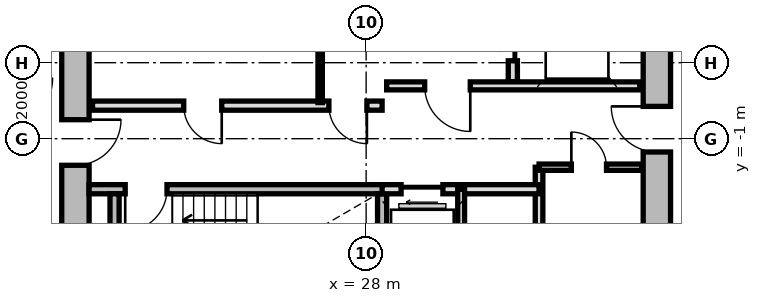
"""IFC4 building model, lengths in metres.
Left out: names, types, materials, properties, quantities, classifications, styles, units other than length and angle.
Written with IfcOpenShell. Run it as: python <this file> out.ifc"""

import sys

from ifc_helpers import new_model, si_unit, direction, frame, frame_2d, origin, place, context, subcontext, project, spatial, rectangle, extrude, source, transform, mapped, element, fill, save


model = new_model("IFC4")
c1 = context("Model", 3, precision=1e-05, world=origin(), true_north=direction((0.0, 1.0)))
c2 = subcontext(c1, "Body", "Model", "MODEL_VIEW")
j1 = project(units=[si_unit("LENGTHUNIT", "METRE"), si_unit("PLANEANGLEUNIT", "RADIAN")], contexts=[c1])
p1 = place(None, origin())
s1 = spatial("IfcSite", under=j1, at=p1, CompositionType="ELEMENT")
p2 = place(p1, origin())
s2 = spatial("IfcBuilding", under=s1, at=p2, CompositionType="ELEMENT")
p3 = place(p2, frame((0.0, 0.0, 84.05)))
s3 = spatial("IfcBuildingStorey", under=s2, at=p3, CompositionType="ELEMENT", Elevation=84.05)
m1 = source(origin(), c2, "Body", "SweptSolid", [
    extrude(rectangle(XDim=11.0, YDim=0.72, at=frame_2d((5.5, 0.0))), origin(), (0.0, 0.0, 1.0), 2.79),
])
p4 = place(p3, frame((20.35, -5.5, 0.0), z_axis=(0.0, 0.0, 1.0), x_axis=(0.0, 1.0, 0.0)))
e1 = element("IfcWall", 1, at=p4, inside=s3, PredefinedType="SHEAR", context=c2, shape_type="MappedRepresentation", body=[
    mapped(m1, transform((0.0, 0.0, 0.0), x_axis=(1.0, 0.0, 0.0), y_axis=(0.0, 1.0, 0.0), z_axis=(0.0, 0.0, 1.0), scale=1.0)),
])
p5 = place(p4, frame((3.8, 0.0, 0.0)))
e2 = element("IfcOpeningElement", 2, at=p5, cuts=e1, PredefinedType="OPENING", context=c2, shape_type="SweptSolid", body=[
    extrude(rectangle(XDim=1.2, YDim=2.15, at=frame_2d((0.6, 1.075))), frame((0.0, 0.37, 0.0), z_axis=(0.0, -1.0, 0.0), x_axis=(1.0, 0.0, 0.0)), (0.0, 0.0, 1.0), 0.74),
])
p6 = place(p3, frame((35.65, 5.5, 0.0), z_axis=(0.0, 0.0, 1.0), x_axis=(0.0, -1.0, 0.0)))
e3 = element("IfcWall", 3, at=p6, inside=s3, PredefinedType="SHEAR", context=c2, shape_type="MappedRepresentation", body=[
    mapped(m1, transform((0.0, 0.0, 0.0), x_axis=(1.0, 0.0, 0.0), y_axis=(0.0, 1.0, 0.0), z_axis=(0.0, 0.0, 1.0), scale=1.0)),
])
p7 = place(p6, frame((5.65, 0.0, 0.0)))
e4 = element("IfcOpeningElement", 4, at=p7, cuts=e3, PredefinedType="OPENING", context=c2, shape_type="SweptSolid", body=[
    extrude(rectangle(XDim=1.2, YDim=2.15, at=frame_2d((0.6, 1.075))), frame((0.0, 0.37, 0.0), z_axis=(0.0, -1.0, 0.0), x_axis=(1.0, 0.0, 0.0)), (0.0, 0.0, 1.0), 0.74),
])
m2 = source(origin(), c2, "Body", "SweptSolid", [
    extrude(rectangle(XDim=7.83, YDim=0.24, at=frame_2d((3.915, 0.0))), origin(), (0.0, 0.0, 1.0), 2.79),
])
p8 = place(p3, frame((20.71, -2.33, 0.0), z_axis=(0.0, 0.0, 1.0), x_axis=(1.0, 0.0, 0.0)))
e5 = element("IfcWall", 5, at=p8, inside=s3, PredefinedType="PARTITIONING", context=c2, shape_type="MappedRepresentation", body=[
    mapped(m2, transform((0.0, 0.0, 0.0), x_axis=(1.0, 0.0, 0.0), y_axis=(0.0, 1.0, 0.0), z_axis=(0.0, 0.0, 1.0), scale=1.0)),
])
p9 = place(p8, frame((0.95, 0.0, 0.0)))
e6 = element("IfcOpeningElement", 6, at=p9, cuts=e5, PredefinedType="OPENING", context=c2, shape_type="SweptSolid", body=[
    extrude(rectangle(XDim=1.1, YDim=2.15, at=frame_2d((0.55, 1.075))), frame((0.0, 0.13, 0.0), z_axis=(0.0, -1.0, 0.0), x_axis=(1.0, 0.0, 0.0)), (0.0, 0.0, 1.0), 0.26),
])
m3 = source(origin(), c2, "Body", "SweptSolid", [
    extrude(rectangle(XDim=3.14, YDim=0.24, at=frame_2d((1.57, 0.0))), origin(), (0.0, 0.0, 1.0), 2.79),
])
for number, where, z_axis, x_axis in (
    (7, (21.38, -5.59, 0.0), (0.0, 0.0, 1.0), (0.0, 1.0, 0.0)),
    (8, (28.42, -5.59, 0.0), (0.0, 0.0, 1.0), (0.0, 1.0, 0.0)),
):
    element("IfcWall", number, at=place(p3, frame(where, z_axis=z_axis, x_axis=x_axis)), inside=s3, PredefinedType="PARTITIONING", context=c2, shape_type="MappedRepresentation", body=[
        mapped(m3, transform((0.0, 0.0, 0.0), x_axis=(1.0, 0.0, 0.0), y_axis=(0.0, 1.0, 0.0), z_axis=(0.0, 0.0, 1.0), scale=1.0)),
    ])
m4 = source(origin(), c2, "Body", "SweptSolid", [
    extrude(rectangle(XDim=5.0, YDim=0.24, at=frame_2d((2.5, 0.0))), origin(), (0.0, 0.0, 1.0), 2.775),
])
p10 = place(p3, frame((31.86, 0.5, 0.0), z_axis=(0.0, 0.0, 1.0), x_axis=(0.0, 1.0, 0.0)))
e9 = element("IfcWall", 9, at=p10, inside=s3, PredefinedType="PARTITIONING", context=c2, shape_type="MappedRepresentation", body=[
    mapped(m4, transform((0.0, 0.0, 0.0), x_axis=(1.0, 0.0, 0.0), y_axis=(0.0, 1.0, 0.0), z_axis=(0.0, 0.0, 1.0), scale=1.0)),
])
p11 = place(p10, frame((3.05, 0.0, 0.0)))
e10 = element("IfcOpeningElement", 10, at=p11, cuts=e9, PredefinedType="OPENING", context=c2, shape_type="SweptSolid", body=[
    extrude(rectangle(XDim=1.3, YDim=2.2, at=frame_2d((0.65, 1.1))), frame((0.0, 0.13, 0.0), z_axis=(0.0, -1.0, 0.0), x_axis=(1.0, 0.0, 0.0)), (0.0, 0.0, 1.0), 0.26),
])
p12 = place(p10, frame((0.55, 0.0, 0.0)))
e11 = element("IfcOpeningElement", 11, at=p12, cuts=e9, PredefinedType="OPENING", context=c2, shape_type="SweptSolid", body=[
    extrude(rectangle(XDim=1.3, YDim=2.2, at=frame_2d((0.65, 1.1))), frame((0.0, 0.13, 0.0), z_axis=(0.0, -1.0, 0.0), x_axis=(1.0, 0.0, 0.0)), (0.0, 0.0, 1.0), 0.26),
])
m5 = source(origin(), c2, "Body", "SweptSolid", [
    extrude(rectangle(XDim=6.66, YDim=0.21, at=frame_2d((3.33, 0.0))), origin(), (0.0, 0.0, 1.0), 2.775),
])
p13 = place(p3, frame((28.54, 0.39, 0.0), z_axis=(0.0, 0.0, 1.0), x_axis=(1.0, 0.0, 0.0)))
e12 = element("IfcWall", 12, at=p13, inside=s3, PredefinedType="PARTITIONING", context=c2, shape_type="MappedRepresentation", body=[
    mapped(m5, transform((0.0, 0.0, 0.0), x_axis=(1.0, 0.0, 0.0), y_axis=(0.0, 1.0, 0.0), z_axis=(0.0, 0.0, 1.0), scale=1.0)),
])
p14 = place(p13, frame((1.0, 0.0, 0.0)))
e13 = element("IfcOpeningElement", 13, at=p14, cuts=e12, PredefinedType="OPENING", context=c2, shape_type="SweptSolid", body=[
    extrude(rectangle(XDim=1.2, YDim=2.15, at=frame_2d((0.6, 1.075))), frame((0.0, 0.115, 0.0), z_axis=(0.0, -1.0, 0.0), x_axis=(1.0, 0.0, 0.0)), (0.0, 0.0, 1.0), 0.23),
])
m6 = source(origin(), c2, "Body", "SweptSolid", [
    extrude(rectangle(XDim=7.62, YDim=0.24, at=frame_2d((3.81, 0.0))), origin(), (0.0, 0.0, 1.0), 2.775),
])
p15 = place(p3, frame((20.8, -0.13, 0.0), z_axis=(0.0, 0.0, 1.0), x_axis=(1.0, 0.0, 0.0)))
e14 = element("IfcWall", 14, at=p15, inside=s3, PredefinedType="PARTITIONING", context=c2, shape_type="MappedRepresentation", body=[
    mapped(m6, transform((0.0, 0.0, 0.0), x_axis=(1.0, 0.0, 0.0), y_axis=(0.0, 1.0, 0.0), z_axis=(0.0, 0.0, 1.0), scale=1.0)),
])
p16 = place(p15, frame((6.22, 0.0, 0.0)))
e15 = element("IfcOpeningElement", 15, at=p16, cuts=e14, PredefinedType="OPENING", context=c2, shape_type="SweptSolid", body=[
    extrude(rectangle(XDim=1.0, YDim=2.1, at=frame_2d((0.5, 1.05))), frame((0.0, 0.13, 0.0), z_axis=(0.0, -1.0, 0.0), x_axis=(1.0, 0.0, 0.0)), (0.0, 0.0, 1.0), 0.26),
])
p17 = place(p15, frame((2.4, 0.0, 0.0)))
e16 = element("IfcOpeningElement", 16, at=p17, cuts=e14, PredefinedType="OPENING", context=c2, shape_type="SweptSolid", body=[
    extrude(rectangle(XDim=1.0, YDim=2.1, at=frame_2d((0.5, 1.05))), frame((0.0, 0.13, 0.0), z_axis=(0.0, -1.0, 0.0), x_axis=(1.0, 0.0, 0.0)), (0.0, 0.0, 1.0), 0.26),
])
m7 = source(origin(), c2, "Body", "SweptSolid", [
    extrude(rectangle(XDim=2.33, YDim=0.115, at=frame_2d((1.165, 0.0))), origin(), (0.0, 0.0, 1.0), 2.775),
])
p18 = place(p3, frame((26.79, -0.05, 0.0), z_axis=(0.0, 0.0, 1.0), x_axis=(0.0, 1.0, 0.0)))
e17 = element("IfcWall", 17, at=p18, inside=s3, PredefinedType="PARTITIONING", context=c2, shape_type="MappedRepresentation", body=[
    mapped(m7, transform((0.0, 0.0, 0.0), x_axis=(1.0, 0.0, 0.0), y_axis=(0.0, 1.0, 0.0), z_axis=(0.0, 0.0, 1.0), scale=1.0)),
])
m8 = source(origin(), c2, "Body", "SweptSolid", [
    extrude(rectangle(XDim=3.8, YDim=0.2, at=frame_2d((1.9, 0.0))), origin(), (0.0, 0.0, 1.0), 2.775),
])
p19 = place(p3, frame((32.55, -5.55, 0.0), z_axis=(0.0, 0.0, 1.0), x_axis=(0.0, 1.0, 0.0)))
e18 = element("IfcWall", 18, at=p19, inside=s3, PredefinedType="PARTITIONING", context=c2, shape_type="MappedRepresentation", body=[
    mapped(m8, transform((0.0, 0.0, 0.0), x_axis=(1.0, 0.0, 0.0), y_axis=(0.0, 1.0, 0.0), z_axis=(0.0, 0.0, 1.0), scale=1.0)),
])
m9 = source(origin(), c2, "Body", "SweptSolid", [
    extrude(rectangle(XDim=4.13, YDim=0.24, at=frame_2d((2.065, 0.0))), origin(), (0.0, 0.0, 1.0), 2.775),
])
p20 = place(p3, frame((28.42, -2.33, 0.0), z_axis=(0.0, 0.0, 1.0), x_axis=(1.0, 0.0, 0.0)))
e19 = element("IfcWall", 19, at=p20, inside=s3, PredefinedType="PARTITIONING", context=c2, shape_type="MappedRepresentation", body=[
    mapped(m9, transform((0.0, 0.0, 0.0), x_axis=(1.0, 0.0, 0.0), y_axis=(0.0, 1.0, 0.0), z_axis=(0.0, 0.0, 1.0), scale=1.0)),
])
p21 = place(p20, frame((0.5, 0.0, 0.0)))
e20 = element("IfcOpeningElement", 20, at=p21, cuts=e19, PredefinedType="OPENING", context=c2, shape_type="SweptSolid", body=[
    extrude(rectangle(XDim=1.1, YDim=2.2, at=frame_2d((0.55, 1.1))), frame((0.0, 0.13, 0.0), z_axis=(0.0, -1.0, 0.0), x_axis=(1.0, 0.0, 0.0)), (0.0, 0.0, 1.0), 0.26),
])
m10 = source(origin(), c2, "Body", "SweptSolid", [
    extrude(rectangle(XDim=3.22, YDim=0.18, at=frame_2d((1.61, 0.0))), origin(), (0.0, 0.0, 1.0), 2.775),
])
p22 = place(p3, frame((30.5, -5.55, 0.0), z_axis=(0.0, 0.0, 1.0), x_axis=(0.0, 1.0, 0.0)))
e21 = element("IfcWall", 21, at=p22, inside=s3, PredefinedType="PARTITIONING", context=c2, shape_type="MappedRepresentation", body=[
    mapped(m10, transform((0.0, 0.0, 0.0), x_axis=(1.0, 0.0, 0.0), y_axis=(0.0, 1.0, 0.0), z_axis=(0.0, 0.0, 1.0), scale=1.0)),
])
m11 = source(origin(), c2, "Body", "SweptSolid", [
    extrude(rectangle(XDim=2.7, YDim=0.165, at=frame_2d((1.35, 0.0))), origin(), (0.0, 0.0, 1.0), 2.775),
])
p23 = place(p3, frame((32.55, -1.75, 0.0), z_axis=(0.0, 0.0, 1.0), x_axis=(1.0, 0.0, 0.0)))
e22 = element("IfcWall", 22, at=p23, inside=s3, PredefinedType="PARTITIONING", context=c2, shape_type="MappedRepresentation", body=[
    mapped(m11, transform((0.0, 0.0, 0.0), x_axis=(1.0, 0.0, 0.0), y_axis=(0.0, 1.0, 0.0), z_axis=(0.0, 0.0, 1.0), scale=1.0)),
])
p24 = place(p23, frame((0.85, 0.0, 0.0)))
e23 = element("IfcOpeningElement", 23, at=p24, cuts=e22, PredefinedType="OPENING", context=c2, shape_type="SweptSolid", body=[
    extrude(rectangle(XDim=0.925, YDim=2.1, at=frame_2d((0.462, 1.05))), frame((0.0, 0.093, 0.0), z_axis=(0.0, -1.0, 0.0), x_axis=(1.0, 0.0, 0.0)), (0.0, 0.0, 1.0), 0.185),
])
m12 = source(origin(), c2, "Body", "SweptSolid", [
    extrude(rectangle(XDim=1.1, YDim=2.15, at=frame_2d((0.55, 1.075))), frame((0.0, 0.025, 0.0), z_axis=(0.0, -1.0, 0.0), x_axis=(1.0, 0.0, 0.0)), (0.0, 0.0, 1.0), 0.05),
])
p25 = place(p9, frame((1.1, 0.0, 0.0), z_axis=(0.0, 0.0, 1.0), x_axis=(-1.0, 0.0, 0.0)))
e24 = element("IfcDoor", 24, at=p25, inside=s3, OperationType="SINGLE_SWING_RIGHT", PredefinedType="DOOR", context=c2, shape_type="MappedRepresentation", body=[
    mapped(m12, transform((0.0, 0.0, 0.0), x_axis=(1.0, 0.0, 0.0), y_axis=(0.0, 1.0, 0.0), z_axis=(0.0, 0.0, 1.0), scale=1.0)),
])
fill(e6, e24)
m13 = source(origin(), c2, "Body", "SweptSolid", [
    extrude(rectangle(XDim=1.3, YDim=2.2, at=frame_2d((0.65, 1.1))), frame((0.0, 0.025, 0.0), z_axis=(0.0, -1.0, 0.0), x_axis=(1.0, 0.0, 0.0)), (0.0, 0.0, 1.0), 0.05),
])
p26 = place(p12, origin())
e25 = element("IfcDoor", 25, at=p26, inside=s3, OperationType="SLIDING_TO_RIGHT", PredefinedType="DOOR", context=c2, shape_type="MappedRepresentation", body=[
    mapped(m13, transform((0.0, 0.0, 0.0), x_axis=(1.0, 0.0, 0.0), y_axis=(0.0, 1.0, 0.0), z_axis=(0.0, 0.0, 1.0), scale=1.0)),
])
fill(e11, e25)
m14 = source(origin(), c2, "Body", "SweptSolid", [
    extrude(rectangle(XDim=1.2, YDim=2.15, at=frame_2d((0.6, 1.075))), frame((0.0, 0.025, 0.0), z_axis=(0.0, -1.0, 0.0), x_axis=(1.0, 0.0, 0.0)), (0.0, 0.0, 1.0), 0.05),
])
p27 = place(p14, frame((1.2, 0.0, 0.0), z_axis=(0.0, 0.0, 1.0), x_axis=(-1.0, 0.0, 0.0)))
e26 = element("IfcDoor", 26, at=p27, inside=s3, OperationType="SINGLE_SWING_LEFT", PredefinedType="DOOR", context=c2, shape_type="MappedRepresentation", body=[
    mapped(m14, transform((0.0, 0.0, 0.0), x_axis=(1.0, 0.0, 0.0), y_axis=(0.0, 1.0, 0.0), z_axis=(0.0, 0.0, 1.0), scale=1.0)),
])
fill(e13, e26)
p28 = place(p5, frame((1.2, 0.0, 0.0), z_axis=(0.0, 0.0, 1.0), x_axis=(-1.0, 0.0, 0.0)))
e27 = element("IfcDoor", 27, at=p28, inside=s3, OperationType="SINGLE_SWING_LEFT", PredefinedType="DOOR", context=c2, shape_type="MappedRepresentation", body=[
    mapped(m14, transform((0.0, 0.0, 0.0), x_axis=(1.0, 0.0, 0.0), y_axis=(0.0, 1.0, 0.0), z_axis=(0.0, 0.0, 1.0), scale=1.0)),
])
fill(e2, e27)
p29 = place(p7, frame((1.2, 0.0, 0.0), z_axis=(0.0, 0.0, 1.0), x_axis=(-1.0, 0.0, 0.0)))
e28 = element("IfcDoor", 28, at=p29, inside=s3, OperationType="SINGLE_SWING_RIGHT", PredefinedType="DOOR", context=c2, shape_type="MappedRepresentation", body=[
    mapped(m14, transform((0.0, 0.0, 0.0), x_axis=(1.0, 0.0, 0.0), y_axis=(0.0, 1.0, 0.0), z_axis=(0.0, 0.0, 1.0), scale=1.0)),
])
fill(e4, e28)
m15 = source(origin(), c2, "Body", "SweptSolid", [
    extrude(rectangle(XDim=1.0, YDim=2.1, at=frame_2d((0.5, 1.05))), frame((0.0, 0.025, 0.0), z_axis=(0.0, -1.0, 0.0), x_axis=(1.0, 0.0, 0.0)), (0.0, 0.0, 1.0), 0.05),
])
p30 = place(p16, frame((1.0, 0.0, 0.0), z_axis=(0.0, 0.0, 1.0), x_axis=(-1.0, 0.0, 0.0)))
e29 = element("IfcDoor", 29, at=p30, inside=s3, OperationType="SINGLE_SWING_LEFT", PredefinedType="DOOR", context=c2, shape_type="MappedRepresentation", body=[
    mapped(m15, transform((0.0, 0.0, 0.0), x_axis=(1.0, 0.0, 0.0), y_axis=(0.0, 1.0, 0.0), z_axis=(0.0, 0.0, 1.0), scale=1.0)),
])
fill(e15, e29)
p31 = place(p17, frame((1.0, 0.0, 0.0), z_axis=(0.0, 0.0, 1.0), x_axis=(-1.0, 0.0, 0.0)))
e30 = element("IfcDoor", 30, at=p31, inside=s3, OperationType="SINGLE_SWING_LEFT", PredefinedType="DOOR", context=c2, shape_type="MappedRepresentation", body=[
    mapped(m15, transform((0.0, 0.0, 0.0), x_axis=(1.0, 0.0, 0.0), y_axis=(0.0, 1.0, 0.0), z_axis=(0.0, 0.0, 1.0), scale=1.0)),
])
fill(e16, e30)
m16 = source(origin(), c2, "Body", "SweptSolid", [
    extrude(rectangle(XDim=1.1, YDim=2.2, at=frame_2d((0.55, 1.1))), frame((0.0, 0.025, 0.0), z_axis=(0.0, -1.0, 0.0), x_axis=(1.0, 0.0, 0.0)), (0.0, 0.0, 1.0), 0.05),
])
p32 = place(p21, frame((1.1, 0.0, 0.0), z_axis=(0.0, 0.0, 1.0), x_axis=(-1.0, 0.0, 0.0)))
e31 = element("IfcDoor", 31, at=p32, inside=s3, OperationType="SLIDING_TO_LEFT", PredefinedType="DOOR", context=c2, shape_type="MappedRepresentation", body=[
    mapped(m16, transform((0.0, 0.0, 0.0), x_axis=(1.0, 0.0, 0.0), y_axis=(0.0, 1.0, 0.0), z_axis=(0.0, 0.0, 1.0), scale=1.0)),
])
fill(e20, e31)
m17 = source(origin(), c2, "Body", "SweptSolid", [
    extrude(rectangle(XDim=0.925, YDim=2.1, at=frame_2d((0.462, 1.05))), frame((0.0, 0.025, 0.0), z_axis=(0.0, -1.0, 0.0), x_axis=(1.0, 0.0, 0.0)), (0.0, 0.0, 1.0), 0.05),
])
p33 = place(p24, origin())
e32 = element("IfcDoor", 32, at=p33, inside=s3, OperationType="SINGLE_SWING_LEFT", PredefinedType="DOOR", context=c2, shape_type="MappedRepresentation", body=[
    mapped(m17, transform((0.0, 0.0, 0.0), x_axis=(1.0, 0.0, 0.0), y_axis=(0.0, 1.0, 0.0), z_axis=(0.0, 0.0, 1.0), scale=1.0)),
])
fill(e23, e32)
save(model, sys.argv[1])
